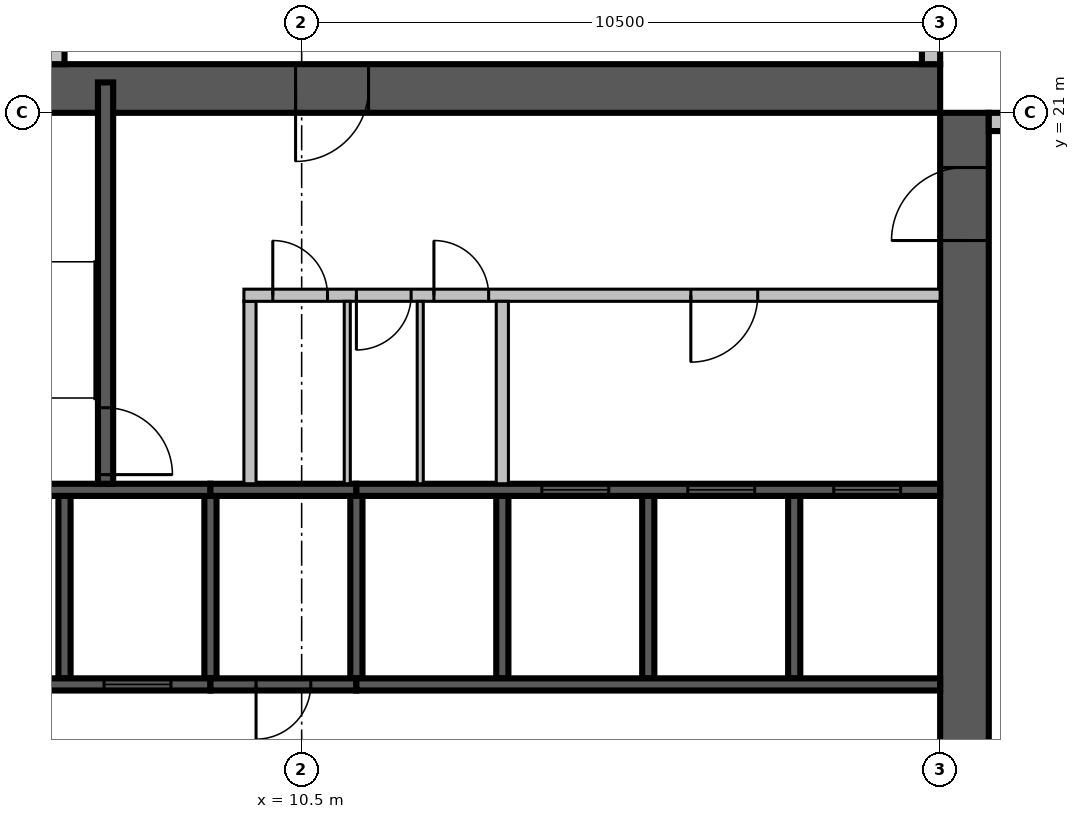
"""IFC4 building model, lengths in metres.
Left out: names, types, materials, properties, quantities, classifications, styles, units other than length and angle.
Written with IfcOpenShell. Run it as: python <this file> out.ifc"""

import sys

from ifc_helpers import new_model, si_unit, direction, frame, frame_2d, origin, place, context, subcontext, project, spatial, rectangle, extrude, source, transform, mapped, element, fill, save


model = new_model("IFC4")
c1 = context("Model", 3, precision=1e-05, world=origin(), true_north=direction((0.0, 1.0)))
c2 = subcontext(c1, "Body", "Model", "MODEL_VIEW")
j1 = project(units=[si_unit("LENGTHUNIT", "METRE"), si_unit("PLANEANGLEUNIT", "RADIAN")], contexts=[c1])
p1 = place(None, origin())
s1 = spatial("IfcSite", under=j1, at=p1, CompositionType="ELEMENT")
p2 = place(p1, origin())
s2 = spatial("IfcBuilding", under=s1, at=p2, CompositionType="ELEMENT")
p3 = place(p2, frame((0.0, 0.0, 200.6)))
s3 = spatial("IfcBuildingStorey", under=s2, at=p3, CompositionType="ELEMENT", Elevation=200.6)
m1 = source(origin(), c2, "Body", "SweptSolid", [
    extrude(rectangle(XDim=16.8, YDim=0.8, at=frame_2d((8.4, 0.0))), origin(), (0.0, 0.0, 1.0), 3.8),
])
p4 = place(p3, frame((21.4, 4.2, 0.0), z_axis=(0.0, 0.0, 1.0), x_axis=(0.0, 1.0, 0.0)))
e1 = element("IfcWall", 1, at=p4, inside=s3, PredefinedType="SHEAR", context=c2, shape_type="MappedRepresentation", body=[
    mapped(m1, transform((0.0, 0.0, 0.0), scale=1.0)),
])
m2 = source(origin(), c2, "Body", "SweptSolid", [
    extrude(rectangle(XDim=2.2, YDim=2.1, at=frame_2d((1.1, 1.05))), frame((0.0, 0.41, 0.0), z_axis=(0.0, -1.0, 0.0), x_axis=(1.0, 0.0, 0.0)), (0.0, 0.0, 1.0), 0.82),
])
p5 = place(p4, frame((4.2, 0.0, 0.0)))
e2 = element("IfcOpeningElement", 2, at=p5, cuts=e1, PredefinedType="OPENING", context=c2, shape_type="MappedRepresentation", body=[
    mapped(m2, transform((0.0, 0.0, 0.0), scale=1.0)),
])
m3 = source(origin(), c2, "Body", "SweptSolid", [
    extrude(rectangle(XDim=1.2, YDim=2.1, at=frame_2d((0.6, 1.05))), frame((0.0, 0.41, 0.0), z_axis=(0.0, -1.0, 0.0), x_axis=(1.0, 0.0, 0.0)), (0.0, 0.0, 1.0), 0.82),
])
p6 = place(p4, frame((14.7, 0.0, 0.0)))
e3 = element("IfcOpeningElement", 3, at=p6, cuts=e1, PredefinedType="OPENING", context=c2, shape_type="MappedRepresentation", body=[
    mapped(m3, transform((0.0, 0.0, 0.0), scale=1.0)),
])
p7 = place(p3, frame((4.2, 21.4, 0.0), z_axis=(0.0, 0.0, 1.0), x_axis=(1.0, 0.0, 0.0)))
e4 = element("IfcWall", 4, at=p7, inside=s3, PredefinedType="SHEAR", context=c2, shape_type="MappedRepresentation", body=[
    mapped(m1, transform((0.0, 0.0, 0.0), scale=1.0)),
])
p8 = place(p7, frame((6.2, 0.0, 0.0)))
e5 = element("IfcOpeningElement", 5, at=p8, cuts=e4, PredefinedType="OPENING", context=c2, shape_type="MappedRepresentation", body=[
    mapped(m3, transform((0.0, 0.0, 0.0), scale=1.0)),
])
m4 = source(origin(), c2, "Body", "SweptSolid", [
    extrude(rectangle(XDim=7.15, YDim=0.3, at=frame_2d((3.575, 0.0))), origin(), (0.0, 0.0, 1.0), 3.4),
])
p9 = place(p3, frame((28.95, 20.85, 0.0), z_axis=(0.0, 0.0, 1.0), x_axis=(-1.0, 0.0, 0.0)))
e6 = element("IfcWall", 6, at=p9, inside=s3, PredefinedType="STANDARD", context=c2, shape_type="MappedRepresentation", body=[
    mapped(m4, transform((0.0, 0.0, 0.0), scale=1.0)),
])
m5 = source(origin(), c2, "Body", "SweptSolid", [
    extrude(rectangle(XDim=3.0, YDim=2.3, at=frame_2d((1.5, 1.15))), frame((0.0, 0.16, 0.0), z_axis=(0.0, -1.0, 0.0), x_axis=(1.0, 0.0, 0.0)), (0.0, 0.0, 1.0), 0.32),
])
p10 = place(p9, frame((0.15, 0.0, 0.6)))
e7 = element("IfcOpeningElement", 7, at=p10, cuts=e6, PredefinedType="OPENING", context=c2, shape_type="MappedRepresentation", body=[
    mapped(m5, transform((0.0, 0.0, 0.0), scale=1.0)),
])
m6 = source(origin(), c2, "Body", "SweptSolid", [
    extrude(rectangle(XDim=1.8, YDim=2.3, at=frame_2d((0.9, 1.15))), frame((0.0, 0.16, 0.0), z_axis=(0.0, -1.0, 0.0), x_axis=(1.0, 0.0, 0.0)), (0.0, 0.0, 1.0), 0.32),
])
p11 = place(p9, frame((4.95, 0.0, 0.6)))
e8 = element("IfcOpeningElement", 8, at=p11, cuts=e6, PredefinedType="OPENING", context=c2, shape_type="MappedRepresentation", body=[
    mapped(m6, transform((0.0, 0.0, 0.0), scale=1.0)),
])
p12 = place(p3, frame((20.85, 21.8, 0.0), z_axis=(0.0, 0.0, 1.0), x_axis=(0.0, 1.0, 0.0)))
e9 = element("IfcWall", 9, at=p12, inside=s3, PredefinedType="STANDARD", context=c2, shape_type="MappedRepresentation", body=[
    mapped(m4, transform((0.0, 0.0, 0.0), scale=1.0)),
])
p13 = place(p12, frame((0.4, 0.0, 0.6)))
e10 = element("IfcOpeningElement", 10, at=p13, cuts=e9, PredefinedType="OPENING", context=c2, shape_type="MappedRepresentation", body=[
    mapped(m6, transform((0.0, 0.0, 0.0), scale=1.0)),
])
p14 = place(p12, frame((4.0, 0.0, 0.6)))
e11 = element("IfcOpeningElement", 11, at=p14, cuts=e9, PredefinedType="OPENING", context=c2, shape_type="MappedRepresentation", body=[
    mapped(m5, transform((0.0, 0.0, 0.0), scale=1.0)),
])
m7 = source(origin(), c2, "Body", "SweptSolid", [
    extrude(rectangle(XDim=16.6, YDim=0.3, at=frame_2d((8.3, 0.0))), origin(), (0.0, 0.0, 1.0), 3.4),
])
p15 = place(p3, frame((6.45, 38.4, 0.0), z_axis=(0.0, 0.0, 1.0), x_axis=(0.0, -1.0, 0.0)))
e12 = element("IfcWall", 12, at=p15, inside=s3, PredefinedType="STANDARD", context=c2, shape_type="MappedRepresentation", body=[
    mapped(m7, transform((0.0, 0.0, 0.0), scale=1.0)),
])
p16 = place(p15, frame((1.15, 0.0, 0.6)))
e13 = element("IfcOpeningElement", 13, at=p16, cuts=e12, PredefinedType="OPENING", context=c2, shape_type="MappedRepresentation", body=[
    mapped(m6, transform((0.0, 0.0, 0.0), scale=1.0)),
])
p17 = place(p15, frame((9.438, 0.0, 0.6)))
e14 = element("IfcOpeningElement", 14, at=p17, cuts=e12, PredefinedType="OPENING", context=c2, shape_type="MappedRepresentation", body=[
    mapped(m6, transform((0.0, 0.0, 0.0), scale=1.0)),
])
m8 = source(origin(), c2, "Body", "SweptSolid", [
    extrude(rectangle(XDim=1.2, YDim=2.3, at=frame_2d((0.6, 1.15))), frame((0.0, 0.16, 0.0), z_axis=(0.0, -1.0, 0.0), x_axis=(1.0, 0.0, 0.0)), (0.0, 0.0, 1.0), 0.32),
])
p18 = place(p15, frame((14.338, 0.0, 0.6)))
e15 = element("IfcOpeningElement", 15, at=p18, cuts=e12, PredefinedType="OPENING", context=c2, shape_type="MappedRepresentation", body=[
    mapped(m8, transform((0.0, 0.0, 0.0), scale=1.0)),
])
p19 = place(p15, frame((11.887, 0.0, 0.6)))
e16 = element("IfcOpeningElement", 16, at=p19, cuts=e12, PredefinedType="OPENING", context=c2, shape_type="MappedRepresentation", body=[
    mapped(m6, transform((0.0, 0.0, 0.0), scale=1.0)),
])
m9 = source(origin(), c2, "Body", "SweptSolid", [
    extrude(rectangle(XDim=1.0, YDim=2.1, at=frame_2d((0.5, 1.05))), frame((0.0, 0.16, 0.0), z_axis=(0.0, -1.0, 0.0), x_axis=(1.0, 0.0, 0.0)), (0.0, 0.0, 1.0), 0.32),
])
p20 = place(p15, frame((5.908, 0.0, 0.0)))
e17 = element("IfcOpeningElement", 17, at=p20, cuts=e12, PredefinedType="OPENING", context=c2, shape_type="MappedRepresentation", body=[
    mapped(m9, transform((0.0, 0.0, 0.0), scale=1.0)),
])
m10 = source(origin(), c2, "Body", "SweptSolid", [
    extrude(rectangle(XDim=3.0, YDim=0.2, at=frame_2d((1.5, 0.0))), origin(), (0.0, 0.0, 1.0), 3.8),
])
p21 = place(p3, frame((6.6, 11.7, 0.0), z_axis=(0.0, 0.0, 1.0), x_axis=(0.0, 1.0, 0.0)))
e18 = element("IfcWall", 18, at=p21, inside=s3, PredefinedType="SOLIDWALL", context=c2, shape_type="MappedRepresentation", body=[
    mapped(m10, transform((0.0, 0.0, 0.0), scale=1.0)),
])
m11 = source(origin(), c2, "Body", "SweptSolid", [
    extrude(rectangle(XDim=3.0, YDim=0.2, at=frame_2d((1.5, 0.0))), origin(), (0.0, 0.0, 1.0), 3.4),
])
for number, where, z_axis, x_axis in (
    (19, (9.0, 11.7, 0.0), (0.0, 0.0, 1.0), (0.0, 1.0, 0.0)),
    (20, (11.4, 11.7, 0.0), (0.0, 0.0, 1.0), (0.0, 1.0, 0.0)),
):
    element("IfcWall", number, at=place(p3, frame(where, z_axis=z_axis, x_axis=x_axis)), inside=s3, PredefinedType="SOLIDWALL", context=c2, shape_type="MappedRepresentation", body=[
        mapped(m11, transform((0.0, 0.0, 0.0), scale=1.0)),
    ])
for number, where, z_axis, x_axis in (
    (21, (13.8, 11.7, 0.0), (0.0, 0.0, 1.0), (0.0, 1.0, 0.0)),
    (22, (16.2, 11.7, 0.0), (0.0, 0.0, 1.0), (0.0, 1.0, 0.0)),
    (23, (18.6, 11.7, 0.0), (0.0, 0.0, 1.0), (0.0, 1.0, 0.0)),
):
    element("IfcWall", number, at=place(p3, frame(where, z_axis=z_axis, x_axis=x_axis)), inside=s3, PredefinedType="SOLIDWALL", context=c2, shape_type="MappedRepresentation", body=[
        mapped(m10, transform((0.0, 0.0, 0.0), scale=1.0)),
    ])
m12 = source(origin(), c2, "Body", "SweptSolid", [
    extrude(rectangle(XDim=4.8, YDim=0.2, at=frame_2d((2.4, 0.0))), origin(), (0.0, 0.0, 1.0), 3.8),
])
p22 = place(p3, frame((4.2, 11.6, 0.0), z_axis=(0.0, 0.0, 1.0), x_axis=(1.0, 0.0, 0.0)))
e24 = element("IfcWall", 24, at=p22, inside=s3, PredefinedType="SOLIDWALL", context=c2, shape_type="MappedRepresentation", body=[
    mapped(m12, transform((0.0, 0.0, 0.0), scale=1.0)),
])
m13 = source(origin(), c2, "Body", "SweptSolid", [
    extrude(rectangle(XDim=1.1, YDim=2.1, at=frame_2d((0.55, 1.05))), frame((0.0, 0.11, 0.0), z_axis=(0.0, -1.0, 0.0), x_axis=(1.0, 0.0, 0.0)), (0.0, 0.0, 1.0), 0.22),
])
p23 = place(p22, frame((0.65, 0.0, 0.0)))
e25 = element("IfcOpeningElement", 25, at=p23, cuts=e24, PredefinedType="OPENING", context=c2, shape_type="MappedRepresentation", body=[
    mapped(m13, transform((0.0, 0.0, 0.0), scale=1.0)),
])
p24 = place(p22, frame((3.05, 0.0, 0.0)))
e26 = element("IfcOpeningElement", 26, at=p24, cuts=e24, PredefinedType="OPENING", context=c2, shape_type="MappedRepresentation", body=[
    mapped(m13, transform((0.0, 0.0, 0.0), scale=1.0)),
])
m14 = source(origin(), c2, "Body", "SweptSolid", [
    extrude(rectangle(XDim=2.4, YDim=0.2, at=frame_2d((1.2, 0.0))), origin(), (0.0, 0.0, 1.0), 3.4),
])
p25 = place(p3, frame((9.0, 11.6, 0.0), z_axis=(0.0, 0.0, 1.0), x_axis=(1.0, 0.0, 0.0)))
e27 = element("IfcWall", 27, at=p25, inside=s3, PredefinedType="SOLIDWALL", context=c2, shape_type="MappedRepresentation", body=[
    mapped(m14, transform((0.0, 0.0, 0.0), scale=1.0)),
])
m15 = source(origin(), c2, "Body", "SweptSolid", [
    extrude(rectangle(XDim=0.9, YDim=2.1, at=frame_2d((0.45, 1.05))), frame((0.0, 0.11, 0.0), z_axis=(0.0, -1.0, 0.0), x_axis=(1.0, 0.0, 0.0)), (0.0, 0.0, 1.0), 0.22),
])
p26 = place(p25, frame((0.75, 0.0, 0.0)))
e28 = element("IfcOpeningElement", 28, at=p26, cuts=e27, PredefinedType="OPENING", context=c2, shape_type="MappedRepresentation", body=[
    mapped(m15, transform((0.0, 0.0, 0.0), scale=1.0)),
])
m16 = source(origin(), c2, "Body", "SweptSolid", [
    extrude(rectangle(XDim=9.6, YDim=0.2, at=frame_2d((4.8, 0.0))), origin(), (0.0, 0.0, 1.0), 3.8),
])
p27 = place(p3, frame((11.4, 11.6, 0.0), z_axis=(0.0, 0.0, 1.0), x_axis=(1.0, 0.0, 0.0)))
e29 = element("IfcWall", 29, at=p27, inside=s3, PredefinedType="SOLIDWALL", context=c2, shape_type="MappedRepresentation", body=[
    mapped(m16, transform((0.0, 0.0, 0.0), scale=1.0)),
])
p28 = place(p3, frame((4.2, 14.8, 0.0), z_axis=(0.0, 0.0, 1.0), x_axis=(1.0, 0.0, 0.0)))
e30 = element("IfcWall", 30, at=p28, inside=s3, PredefinedType="SOLIDWALL", context=c2, shape_type="MappedRepresentation", body=[
    mapped(m12, transform((0.0, 0.0, 0.0), scale=1.0)),
])
p29 = place(p3, frame((9.0, 14.8, 0.0), z_axis=(0.0, 0.0, 1.0), x_axis=(1.0, 0.0, 0.0)))
e31 = element("IfcWall", 31, at=p29, inside=s3, PredefinedType="SOLIDWALL", context=c2, shape_type="MappedRepresentation", body=[
    mapped(m14, transform((0.0, 0.0, 0.0), scale=1.0)),
])
p30 = place(p3, frame((11.4, 14.8, 0.0), z_axis=(0.0, 0.0, 1.0), x_axis=(1.0, 0.0, 0.0)))
e32 = element("IfcWall", 32, at=p30, inside=s3, PredefinedType="SOLIDWALL", context=c2, shape_type="MappedRepresentation", body=[
    mapped(m16, transform((0.0, 0.0, 0.0), scale=1.0)),
])
p31 = place(p30, frame((3.05, 0.0, 0.0)))
e33 = element("IfcOpeningElement", 33, at=p31, cuts=e32, PredefinedType="OPENING", context=c2, shape_type="MappedRepresentation", body=[
    mapped(m13, transform((0.0, 0.0, 0.0), scale=1.0)),
])
p32 = place(p30, frame((5.45, 0.0, 0.0)))
e34 = element("IfcOpeningElement", 34, at=p32, cuts=e32, PredefinedType="OPENING", context=c2, shape_type="MappedRepresentation", body=[
    mapped(m13, transform((0.0, 0.0, 0.0), scale=1.0)),
])
p33 = place(p30, frame((7.85, 0.0, 0.0)))
e35 = element("IfcOpeningElement", 35, at=p33, cuts=e32, PredefinedType="OPENING", context=c2, shape_type="MappedRepresentation", body=[
    mapped(m13, transform((0.0, 0.0, 0.0), scale=1.0)),
])
m17 = source(origin(), c2, "Body", "SweptSolid", [
    extrude(rectangle(XDim=6.6, YDim=0.25, at=frame_2d((3.3, 0.0))), origin(), (0.0, 0.0, 1.0), 3.4),
])
p34 = place(p3, frame((7.275, 14.9, 0.0), z_axis=(0.0, 0.0, 1.0), x_axis=(0.0, 1.0, 0.0)))
e36 = element("IfcWall", 36, at=p34, inside=s3, PredefinedType="SOLIDWALL", context=c2, shape_type="MappedRepresentation", body=[
    mapped(m17, transform((0.0, 0.0, 0.0), scale=1.0)),
])
m18 = source(origin(), c2, "Body", "SweptSolid", [
    extrude(rectangle(XDim=1.1, YDim=2.1, at=frame_2d((0.55, 1.05))), frame((0.0, 0.135, 0.0), z_axis=(0.0, -1.0, 0.0), x_axis=(1.0, 0.0, 0.0)), (0.0, 0.0, 1.0), 0.27),
])
p35 = place(p34, frame((0.15, 0.0, 0.0)))
e37 = element("IfcOpeningElement", 37, at=p35, cuts=e36, PredefinedType="OPENING", context=c2, shape_type="MappedRepresentation", body=[
    mapped(m18, transform((0.0, 0.0, 0.0), scale=1.0)),
])
m19 = source(origin(), c2, "Body", "SweptSolid", [
    extrude(rectangle(XDim=3.0, YDim=0.2, at=frame_2d((1.5, 0.0))), origin(), (0.0, 0.0, 1.0), 3.4),
])
p36 = place(p3, frame((9.65, 14.9, 0.0), z_axis=(0.0, 0.0, 1.0), x_axis=(0.0, 1.0, 0.0)))
e38 = element("IfcWall", 38, at=p36, inside=s3, PredefinedType="PARTITIONING", context=c2, shape_type="MappedRepresentation", body=[
    mapped(m19, transform((0.0, 0.0, 0.0), scale=1.0)),
])
m20 = source(origin(), c2, "Body", "SweptSolid", [
    extrude(rectangle(XDim=11.45, YDim=0.2, at=frame_2d((5.725, 0.0))), origin(), (0.0, 0.0, 1.0), 3.4),
])
p37 = place(p3, frame((9.55, 18.0, 0.0), z_axis=(0.0, 0.0, 1.0), x_axis=(1.0, 0.0, 0.0)))
e39 = element("IfcWall", 39, at=p37, inside=s3, PredefinedType="PARTITIONING", context=c2, shape_type="MappedRepresentation", body=[
    mapped(m20, transform((0.0, 0.0, 0.0), scale=1.0)),
])
p38 = place(p37, frame((0.475, 0.0, 0.0)))
e40 = element("IfcOpeningElement", 40, at=p38, cuts=e39, PredefinedType="OPENING", context=c2, shape_type="MappedRepresentation", body=[
    mapped(m15, transform((0.0, 0.0, 0.0), scale=1.0)),
])
p39 = place(p37, frame((1.85, 0.0, 0.0)))
e41 = element("IfcOpeningElement", 41, at=p39, cuts=e39, PredefinedType="OPENING", context=c2, shape_type="MappedRepresentation", body=[
    mapped(m15, transform((0.0, 0.0, 0.0), scale=1.0)),
])
p40 = place(p37, frame((3.125, 0.0, 0.0)))
e42 = element("IfcOpeningElement", 42, at=p40, cuts=e39, PredefinedType="OPENING", context=c2, shape_type="MappedRepresentation", body=[
    mapped(m15, transform((0.0, 0.0, 0.0), scale=1.0)),
])
p41 = place(p37, frame((7.35, 0.0, 0.0)))
e43 = element("IfcOpeningElement", 43, at=p41, cuts=e39, PredefinedType="OPENING", context=c2, shape_type="MappedRepresentation", body=[
    mapped(m13, transform((0.0, 0.0, 0.0), scale=1.0)),
])
p42 = place(p3, frame((13.8, 14.9, 0.0), z_axis=(0.0, 0.0, 1.0), x_axis=(0.0, 1.0, 0.0)))
e44 = element("IfcWall", 44, at=p42, inside=s3, PredefinedType="PARTITIONING", context=c2, shape_type="MappedRepresentation", body=[
    mapped(m19, transform((0.0, 0.0, 0.0), scale=1.0)),
])
m21 = source(origin(), c2, "Body", "SweptSolid", [
    extrude(rectangle(XDim=3.0, YDim=0.1, at=frame_2d((1.5, 0.0))), origin(), (0.0, 0.0, 1.0), 3.4),
])
for number, where, z_axis, x_axis in (
    (45, (11.25, 14.9, 0.0), (0.0, 0.0, 1.0), (0.0, 1.0, 0.0)),
    (46, (12.45, 14.9, 0.0), (0.0, 0.0, 1.0), (0.0, 1.0, 0.0)),
):
    element("IfcWall", number, at=place(p3, frame(where, z_axis=z_axis, x_axis=x_axis)), inside=s3, PredefinedType="PARTITIONING", context=c2, shape_type="MappedRepresentation", body=[
        mapped(m21, transform((0.0, 0.0, 0.0), scale=1.0)),
    ])
m22 = source(origin(), c2, "Body", "SweptSolid", [
    extrude(rectangle(XDim=1.1, YDim=2.1, at=frame_2d((0.55, 1.05))), frame((0.0, 0.025, 0.0), z_axis=(0.0, -1.0, 0.0), x_axis=(1.0, 0.0, 0.0)), (0.0, 0.0, 1.0), 0.05),
])
p43 = place(p24, origin())
e47 = element("IfcDoor", 47, at=p43, inside=s3, OperationType="SLIDING_TO_LEFT", PredefinedType="DOOR", context=c2, shape_type="MappedRepresentation", body=[
    mapped(m22, transform((0.0, 0.0, 0.0), scale=1.0)),
])
fill(e26, e47)
m23 = source(origin(), c2, "Body", "SweptSolid", [
    extrude(rectangle(XDim=0.9, YDim=2.1, at=frame_2d((0.45, 1.05))), frame((0.0, 0.025, 0.0), z_axis=(0.0, -1.0, 0.0), x_axis=(1.0, 0.0, 0.0)), (0.0, 0.0, 1.0), 0.05),
])
p44 = place(p26, origin())
e48 = element("IfcDoor", 48, at=p44, inside=s3, OperationType="SINGLE_SWING_RIGHT", PredefinedType="DOOR", context=c2, shape_type="MappedRepresentation", body=[
    mapped(m23, transform((0.0, 0.0, 0.0), scale=1.0)),
])
fill(e28, e48)
p45 = place(p31, origin())
e49 = element("IfcDoor", 49, at=p45, inside=s3, OperationType="SLIDING_TO_LEFT", PredefinedType="DOOR", context=c2, shape_type="MappedRepresentation", body=[
    mapped(m22, transform((0.0, 0.0, 0.0), scale=1.0)),
])
fill(e33, e49)
p46 = place(p32, origin())
e50 = element("IfcDoor", 50, at=p46, inside=s3, OperationType="SLIDING_TO_LEFT", PredefinedType="DOOR", context=c2, shape_type="MappedRepresentation", body=[
    mapped(m22, transform((0.0, 0.0, 0.0), scale=1.0)),
])
fill(e34, e50)
p47 = place(p33, origin())
e51 = element("IfcDoor", 51, at=p47, inside=s3, OperationType="SLIDING_TO_LEFT", PredefinedType="DOOR", context=c2, shape_type="MappedRepresentation", body=[
    mapped(m22, transform((0.0, 0.0, 0.0), scale=1.0)),
])
fill(e35, e51)
p48 = place(p35, origin())
e52 = element("IfcDoor", 52, at=p48, inside=s3, OperationType="SINGLE_SWING_RIGHT", PredefinedType="DOOR", context=c2, shape_type="MappedRepresentation", body=[
    mapped(m22, transform((0.0, 0.0, 0.0), scale=1.0)),
])
fill(e37, e52)
p49 = place(p38, origin())
e53 = element("IfcDoor", 53, at=p49, inside=s3, OperationType="SINGLE_SWING_LEFT", PredefinedType="DOOR", context=c2, shape_type="MappedRepresentation", body=[
    mapped(m23, transform((0.0, 0.0, 0.0), scale=1.0)),
])
fill(e40, e53)
p50 = place(p39, origin())
e54 = element("IfcDoor", 54, at=p50, inside=s3, OperationType="SINGLE_SWING_RIGHT", PredefinedType="DOOR", context=c2, shape_type="MappedRepresentation", body=[
    mapped(m23, transform((0.0, 0.0, 0.0), scale=1.0)),
])
fill(e41, e54)
p51 = place(p40, origin())
e55 = element("IfcDoor", 55, at=p51, inside=s3, OperationType="SINGLE_SWING_LEFT", PredefinedType="DOOR", context=c2, shape_type="MappedRepresentation", body=[
    mapped(m23, transform((0.0, 0.0, 0.0), scale=1.0)),
])
fill(e42, e55)
p52 = place(p41, origin())
e56 = element("IfcDoor", 56, at=p52, inside=s3, OperationType="SINGLE_SWING_RIGHT", PredefinedType="DOOR", context=c2, shape_type="MappedRepresentation", body=[
    mapped(m22, transform((0.0, 0.0, 0.0), scale=1.0)),
])
fill(e43, e56)
m24 = source(origin(), c2, "Body", "SweptSolid", [
    extrude(rectangle(XDim=1.2, YDim=2.1, at=frame_2d((0.6, 1.05))), frame((0.0, 0.025, 0.0), z_axis=(0.0, -1.0, 0.0), x_axis=(1.0, 0.0, 0.0)), (0.0, 0.0, 1.0), 0.05),
])
p53 = place(p8, origin())
e57 = element("IfcDoor", 57, at=p53, inside=s3, OperationType="SINGLE_SWING_RIGHT", PredefinedType="DOOR", context=c2, shape_type="MappedRepresentation", body=[
    mapped(m24, transform((0.0, 0.0, 0.0), scale=1.0)),
])
fill(e5, e57)
p54 = place(p6, origin())
e58 = element("IfcDoor", 58, at=p54, inside=s3, OperationType="SINGLE_SWING_LEFT", PredefinedType="DOOR", context=c2, shape_type="MappedRepresentation", body=[
    mapped(m24, transform((0.0, 0.0, 0.0), scale=1.0)),
])
fill(e3, e58)
save(model, sys.argv[1])
